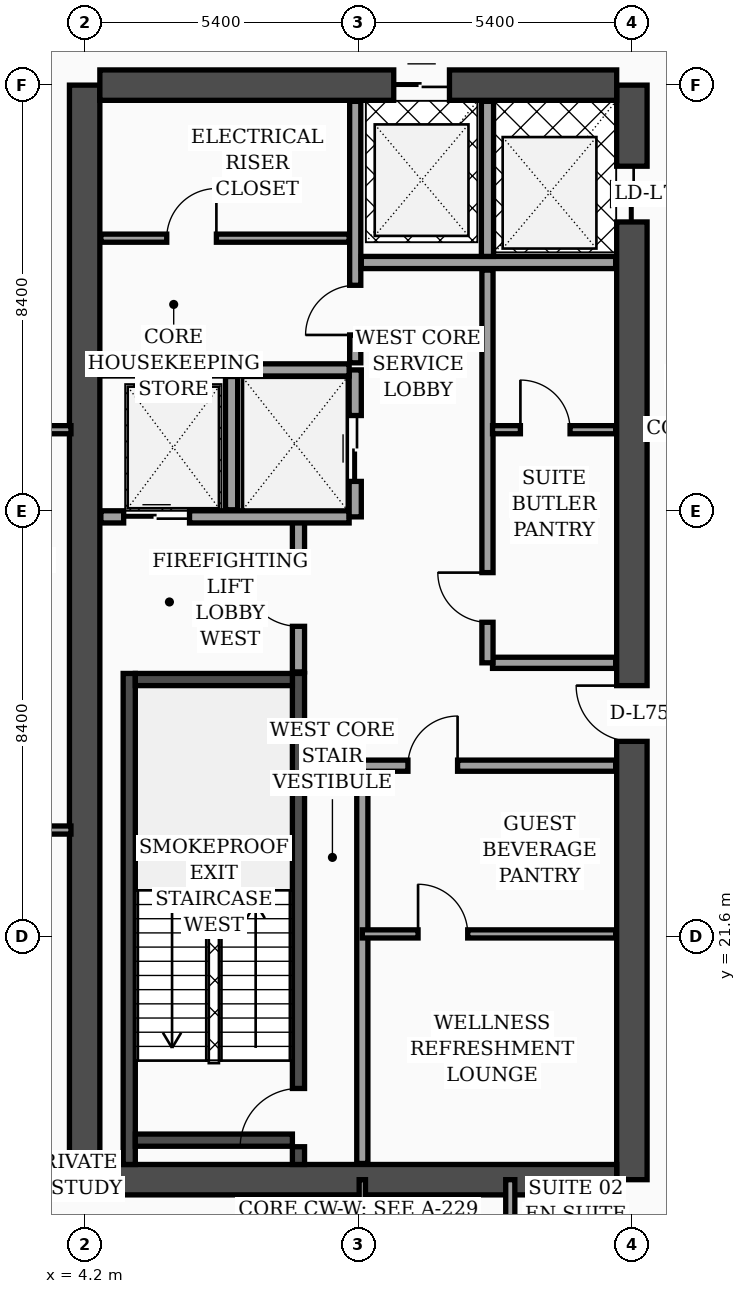
"""IFC4 building model, lengths in metres.
Left out: names, types, materials, properties, quantities, classifications, styles, units other than length and angle.
Written with IfcOpenShell. Run it as: python <this file> out.ifc"""

import sys

from ifc_helpers import new_model, si_unit, direction, frame, frame_2d, origin, place, context, subcontext, project, spatial, rectangle, extrude, element, fill, save


model = new_model("IFC4")
c1 = context("Model", 3, precision=1e-05, world=origin(), true_north=direction((0.0, 1.0)))
c2 = subcontext(c1, "Body", "Model", "MODEL_VIEW")
j1 = project(units=[si_unit("LENGTHUNIT", "METRE"), si_unit("PLANEANGLEUNIT", "RADIAN")], contexts=[c1])
p1 = place(None, origin())
s1 = spatial("IfcSite", under=j1, at=p1, CompositionType="ELEMENT")
p2 = place(p1, origin())
s2 = spatial("IfcBuilding", under=s1, at=p2, CompositionType="ELEMENT")
p3 = place(p2, frame((0.0, 0.0, 302.5)))
s3 = spatial("IfcBuildingStorey", under=s2, at=p3, CompositionType="ELEMENT", Elevation=302.5)
p4 = place(p3, frame((4.2, 16.8, 0.0), z_axis=(0.0, 0.0, 1.0), x_axis=(0.0, 1.0, 0.0)))
e1 = element("IfcWall", 1, at=p4, inside=s3, PredefinedType="SHEAR", context=c2, shape_type="SweptSolid", body=[
    extrude(rectangle(XDim=21.6, YDim=0.6, at=frame_2d((10.8, 0.0))), origin(), (0.0, 0.0, 1.0), 4.05),
])
p5 = place(p3, frame((15.0, 16.8, 0.0), z_axis=(0.0, 0.0, 1.0), x_axis=(0.0, 1.0, 0.0)))
e2 = element("IfcWall", 2, at=p5, inside=s3, PredefinedType="SHEAR", context=c2, shape_type="SweptSolid", body=[
    extrude(rectangle(XDim=21.6, YDim=0.6, at=frame_2d((10.8, 0.0))), origin(), (0.0, 0.0, 1.0), 4.05),
])
p6 = place(p5, frame((8.65, 0.0, 0.0)))
e3 = element("IfcOpeningElement", 3, at=p6, cuts=e2, PredefinedType="OPENING", context=c2, shape_type="SweptSolid", body=[
    extrude(rectangle(XDim=1.1, YDim=2.2, at=frame_2d((0.55, 1.1))), frame((0.0, 0.31, 0.0), z_axis=(0.0, -1.0, 0.0), x_axis=(1.0, 0.0, 0.0)), (0.0, 0.0, 1.0), 0.62),
])
p7 = place(p5, frame((18.9, 0.0, 0.0)))
e4 = element("IfcOpeningElement", 4, at=p7, cuts=e2, PredefinedType="OPENING", context=c2, shape_type="SweptSolid", body=[
    extrude(rectangle(XDim=1.1, YDim=2.2, at=frame_2d((0.55, 1.1))), frame((0.0, 0.31, 0.0), z_axis=(0.0, -1.0, 0.0), x_axis=(1.0, 0.0, 0.0)), (0.0, 0.0, 1.0), 0.62),
])
p8 = place(p3, frame((4.5, 38.4, 0.0), z_axis=(0.0, 0.0, 1.0), x_axis=(1.0, 0.0, 0.0)))
e5 = element("IfcWall", 5, at=p8, inside=s3, PredefinedType="SHEAR", context=c2, shape_type="SweptSolid", body=[
    extrude(rectangle(XDim=10.2, YDim=0.6, at=frame_2d((5.1, 0.0))), origin(), (0.0, 0.0, 1.0), 4.05),
])
p9 = place(p8, frame((5.8, 0.0, 0.0)))
e6 = element("IfcOpeningElement", 6, at=p9, cuts=e5, PredefinedType="OPENING", context=c2, shape_type="SweptSolid", body=[
    extrude(rectangle(XDim=1.1, YDim=2.2, at=frame_2d((0.55, 1.1))), frame((0.0, 0.31, 0.0), z_axis=(0.0, -1.0, 0.0), x_axis=(1.0, 0.0, 0.0)), (0.0, 0.0, 1.0), 0.62),
])
p10 = place(p3, frame((4.5, 16.8, 0.0), z_axis=(0.0, 0.0, 1.0), x_axis=(1.0, 0.0, 0.0)))
e7 = element("IfcWall", 7, at=p10, inside=s3, PredefinedType="SHEAR", context=c2, shape_type="SweptSolid", body=[
    extrude(rectangle(XDim=10.2, YDim=0.6, at=frame_2d((5.1, 0.0))), origin(), (0.0, 0.0, 1.0), 4.05),
])
p11 = place(p3, frame((5.08, 17.1, 0.0), z_axis=(0.0, 0.0, 1.0), x_axis=(0.0, 1.0, 0.0)))
e8 = element("IfcWall", 8, at=p11, inside=s3, PredefinedType="SOLIDWALL", context=c2, shape_type="SweptSolid", body=[
    extrude(rectangle(XDim=9.69, YDim=0.24, at=frame_2d((4.845, 0.0))), origin(), (0.0, 0.0, 1.0), 4.05),
])
p12 = place(p3, frame((8.42, 17.1, 0.0), z_axis=(0.0, 0.0, 1.0), x_axis=(0.0, 1.0, 0.0)))
e9 = element("IfcWall", 9, at=p12, inside=s3, PredefinedType="SOLIDWALL", context=c2, shape_type="SweptSolid", body=[
    extrude(rectangle(XDim=9.69, YDim=0.24, at=frame_2d((4.845, 0.0))), origin(), (0.0, 0.0, 1.0), 4.05),
])
p13 = place(p12, frame((0.35, 0.0, 0.0)))
e10 = element("IfcOpeningElement", 10, at=p13, cuts=e9, PredefinedType="OPENING", context=c2, shape_type="SweptSolid", body=[
    extrude(rectangle(XDim=1.15, YDim=2.2, at=frame_2d((0.575, 1.1))), frame((0.0, 0.13, 0.0), z_axis=(0.0, -1.0, 0.0), x_axis=(1.0, 0.0, 0.0)), (0.0, 0.0, 1.0), 0.26),
])
for number, where, z_axis, x_axis in (
    (11, (5.2, 17.58, 0.0), (0.0, 0.0, 1.0), (1.0, 0.0, 0.0)),
    (12, (5.2, 26.67, 0.0), (0.0, 0.0, 1.0), (1.0, 0.0, 0.0)),
):
    element("IfcWall", number, at=place(p3, frame(where, z_axis=z_axis, x_axis=x_axis)), inside=s3, PredefinedType="SOLIDWALL", context=c2, shape_type="SweptSolid", body=[
        extrude(rectangle(XDim=3.1, YDim=0.24, at=frame_2d((1.55, 0.0))), origin(), (0.0, 0.0, 1.0), 4.05),
    ])
p14 = place(p3, frame((8.42, 26.82, 0.0), z_axis=(0.0, 0.0, 1.0), x_axis=(0.0, 1.0, 0.0)))
e13 = element("IfcWall", 13, at=p14, inside=s3, PredefinedType="SOLIDWALL", context=c2, shape_type="SweptSolid", body=[
    extrude(rectangle(XDim=3.0, YDim=0.24, at=frame_2d((1.5, 0.0))), origin(), (0.0, 0.0, 1.0), 4.05),
])
p15 = place(p14, frame((0.9, 0.0, 0.0)))
e14 = element("IfcOpeningElement", 14, at=p15, cuts=e13, PredefinedType="OPENING", context=c2, shape_type="SweptSolid", body=[
    extrude(rectangle(XDim=1.1, YDim=2.2, at=frame_2d((0.55, 1.1))), frame((0.0, 0.13, 0.0), z_axis=(0.0, -1.0, 0.0), x_axis=(1.0, 0.0, 0.0)), (0.0, 0.0, 1.0), 0.26),
])
p16 = place(p3, frame((4.52, 29.88, 0.0), z_axis=(0.0, 0.0, 1.0), x_axis=(1.0, 0.0, 0.0)))
e15 = element("IfcWall", 15, at=p16, inside=s3, PredefinedType="SOLIDWALL", context=c2, shape_type="SweptSolid", body=[
    extrude(rectangle(XDim=4.9, YDim=0.24, at=frame_2d((2.45, 0.0))), origin(), (0.0, 0.0, 1.0), 4.05),
])
p17 = place(p16, frame((0.45, 0.0, 0.0)))
e16 = element("IfcOpeningElement", 16, at=p17, cuts=e15, PredefinedType="OPENING", context=c2, shape_type="SweptSolid", body=[
    extrude(rectangle(XDim=1.3, YDim=2.35, at=frame_2d((0.65, 1.175))), frame((0.0, 0.13, 0.0), z_axis=(0.0, -1.0, 0.0), x_axis=(1.0, 0.0, 0.0)), (0.0, 0.0, 1.0), 0.26),
])
p18 = place(p3, frame((7.1, 30.02, 0.0), z_axis=(0.0, 0.0, 1.0), x_axis=(0.0, 1.0, 0.0)))
e17 = element("IfcWall", 17, at=p18, inside=s3, PredefinedType="SOLIDWALL", context=c2, shape_type="SweptSolid", body=[
    extrude(rectangle(XDim=2.63, YDim=0.24, at=frame_2d((1.315, 0.0))), origin(), (0.0, 0.0, 1.0), 4.05),
])
p19 = place(p3, frame((9.54, 29.88, 0.0), z_axis=(0.0, 0.0, 1.0), x_axis=(0.0, 1.0, 0.0)))
e18 = element("IfcWall", 18, at=p19, inside=s3, PredefinedType="SOLIDWALL", context=c2, shape_type="SweptSolid", body=[
    extrude(rectangle(XDim=2.9, YDim=0.24, at=frame_2d((1.45, 0.0))), origin(), (0.0, 0.0, 1.0), 4.05),
])
p20 = place(p19, frame((0.7, 0.0, 0.0)))
e19 = element("IfcOpeningElement", 19, at=p20, cuts=e18, PredefinedType="OPENING", context=c2, shape_type="SweptSolid", body=[
    extrude(rectangle(XDim=1.3, YDim=2.35, at=frame_2d((0.65, 1.175))), frame((0.0, 0.13, 0.0), z_axis=(0.0, -1.0, 0.0), x_axis=(1.0, 0.0, 0.0)), (0.0, 0.0, 1.0), 0.26),
])
p21 = place(p3, frame((4.52, 32.78, 0.0), z_axis=(0.0, 0.0, 1.0), x_axis=(1.0, 0.0, 0.0)))
e20 = element("IfcWall", 20, at=p21, inside=s3, PredefinedType="SOLIDWALL", context=c2, shape_type="SweptSolid", body=[
    extrude(rectangle(XDim=4.9, YDim=0.24, at=frame_2d((2.45, 0.0))), origin(), (0.0, 0.0, 1.0), 3.7),
])
p22 = place(p3, frame((9.68, 17.12, 0.0), z_axis=(0.0, 0.0, 1.0), x_axis=(0.0, 1.0, 0.0)))
e21 = element("IfcWall", 21, at=p22, inside=s3, PredefinedType="SOLIDWALL", context=c2, shape_type="SweptSolid", body=[
    extrude(rectangle(XDim=7.88, YDim=0.22, at=frame_2d((3.94, 0.0))), origin(), (0.0, 0.0, 1.0), 4.05),
])
p23 = place(p3, frame((4.52, 35.38, 0.0), z_axis=(0.0, 0.0, 1.0), x_axis=(1.0, 0.0, 0.0)))
e22 = element("IfcWall", 22, at=p23, inside=s3, PredefinedType="PARTITIONING", context=c2, shape_type="SweptSolid", body=[
    extrude(rectangle(XDim=4.9, YDim=0.16, at=frame_2d((2.45, 0.0))), origin(), (0.0, 0.0, 1.0), 4.05),
])
p24 = place(p23, frame((1.3, 0.0, 0.0)))
e23 = element("IfcOpeningElement", 23, at=p24, cuts=e22, PredefinedType="OPENING", context=c2, shape_type="SweptSolid", body=[
    extrude(rectangle(XDim=0.98, YDim=2.15, at=frame_2d((0.49, 1.075))), frame((0.0, 0.09, 0.0), z_axis=(0.0, -1.0, 0.0), x_axis=(1.0, 0.0, 0.0)), (0.0, 0.0, 1.0), 0.18),
])
p25 = place(p3, frame((9.54, 32.92, 0.0), z_axis=(0.0, 0.0, 1.0), x_axis=(0.0, 1.0, 0.0)))
e24 = element("IfcWall", 24, at=p25, inside=s3, PredefinedType="SOLIDWALL", context=c2, shape_type="SweptSolid", body=[
    extrude(rectangle(XDim=5.16, YDim=0.22, at=frame_2d((2.58, 0.0))), origin(), (0.0, 0.0, 1.0), 4.05),
])
p26 = place(p25, frame((0.55, 0.0, 0.0)))
e25 = element("IfcOpeningElement", 25, at=p26, cuts=e24, PredefinedType="OPENING", context=c2, shape_type="SweptSolid", body=[
    extrude(rectangle(XDim=0.98, YDim=2.15, at=frame_2d((0.49, 1.075))), frame((0.0, 0.12, 0.0), z_axis=(0.0, -1.0, 0.0), x_axis=(1.0, 0.0, 0.0)), (0.0, 0.0, 1.0), 0.24),
])
p27 = place(p3, frame((9.68, 21.65, 0.0), z_axis=(0.0, 0.0, 1.0), x_axis=(1.0, 0.0, 0.0)))
e26 = element("IfcWall", 26, at=p27, inside=s3, PredefinedType="PARTITIONING", context=c2, shape_type="SweptSolid", body=[
    extrude(rectangle(XDim=5.0, YDim=0.16, at=frame_2d((2.5, 0.0))), origin(), (0.0, 0.0, 1.0), 4.05),
])
p28 = place(p27, frame((1.1, 0.0, 0.0)))
e27 = element("IfcOpeningElement", 27, at=p28, cuts=e26, PredefinedType="OPENING", context=c2, shape_type="SweptSolid", body=[
    extrude(rectangle(XDim=0.98, YDim=2.15, at=frame_2d((0.49, 1.075))), frame((0.0, 0.09, 0.0), z_axis=(0.0, -1.0, 0.0), x_axis=(1.0, 0.0, 0.0)), (0.0, 0.0, 1.0), 0.18),
])
p29 = place(p3, frame((9.68, 24.97, 0.0), z_axis=(0.0, 0.0, 1.0), x_axis=(1.0, 0.0, 0.0)))
e28 = element("IfcWall", 28, at=p29, inside=s3, PredefinedType="SOLIDWALL", context=c2, shape_type="SweptSolid", body=[
    extrude(rectangle(XDim=5.0, YDim=0.22, at=frame_2d((2.5, 0.0))), origin(), (0.0, 0.0, 1.0), 3.5),
])
p30 = place(p29, frame((0.9, 0.0, 0.0)))
e29 = element("IfcOpeningElement", 29, at=p30, cuts=e28, PredefinedType="OPENING", context=c2, shape_type="SweptSolid", body=[
    extrude(rectangle(XDim=0.98, YDim=2.15, at=frame_2d((0.49, 1.075))), frame((0.0, 0.12, 0.0), z_axis=(0.0, -1.0, 0.0), x_axis=(1.0, 0.0, 0.0)), (0.0, 0.0, 1.0), 0.24),
])
p31 = place(p3, frame((12.25, 27.0, 0.0), z_axis=(0.0, 0.0, 1.0), x_axis=(1.0, 0.0, 0.0)))
e30 = element("IfcWall", 30, at=p31, inside=s3, PredefinedType="SOLIDWALL", context=c2, shape_type="SweptSolid", body=[
    extrude(rectangle(XDim=2.43, YDim=0.22, at=frame_2d((1.215, 0.0))), origin(), (0.0, 0.0, 1.0), 4.05),
])
p32 = place(p3, frame((12.15, 27.0, 0.0), z_axis=(0.0, 0.0, 1.0), x_axis=(0.0, 1.0, 0.0)))
e31 = element("IfcWall", 31, at=p32, inside=s3, PredefinedType="SOLIDWALL", context=c2, shape_type="SweptSolid", body=[
    extrude(rectangle(XDim=7.75, YDim=0.22, at=frame_2d((3.875, 0.0))), origin(), (0.0, 0.0, 1.0), 4.05),
])
p33 = place(p32, frame((0.8, 0.0, 0.0)))
e32 = element("IfcOpeningElement", 32, at=p33, cuts=e31, PredefinedType="OPENING", context=c2, shape_type="SweptSolid", body=[
    extrude(rectangle(XDim=0.98, YDim=2.15, at=frame_2d((0.49, 1.075))), frame((0.0, 0.12, 0.0), z_axis=(0.0, -1.0, 0.0), x_axis=(1.0, 0.0, 0.0)), (0.0, 0.0, 1.0), 0.24),
])
p34 = place(p3, frame((12.25, 31.6, 0.0), z_axis=(0.0, 0.0, 1.0), x_axis=(1.0, 0.0, 0.0)))
e33 = element("IfcWall", 33, at=p34, inside=s3, PredefinedType="PARTITIONING", context=c2, shape_type="SweptSolid", body=[
    extrude(rectangle(XDim=2.43, YDim=0.16, at=frame_2d((1.215, 0.0))), origin(), (0.0, 0.0, 1.0), 3.65),
])
p35 = place(p34, frame((0.55, 0.0, 0.0)))
e34 = element("IfcOpeningElement", 34, at=p35, cuts=e33, PredefinedType="OPENING", context=c2, shape_type="SweptSolid", body=[
    extrude(rectangle(XDim=0.98, YDim=2.15, at=frame_2d((0.49, 1.075))), frame((0.0, 0.09, 0.0), z_axis=(0.0, -1.0, 0.0), x_axis=(1.0, 0.0, 0.0)), (0.0, 0.0, 1.0), 0.18),
])
p36 = place(p3, frame((9.66, 34.9, 0.0), z_axis=(0.0, 0.0, 1.0), x_axis=(1.0, 0.0, 0.0)))
e35 = element("IfcWall", 35, at=p36, inside=s3, PredefinedType="SOLIDWALL", context=c2, shape_type="SweptSolid", body=[
    extrude(rectangle(XDim=5.02, YDim=0.24, at=frame_2d((2.51, 0.0))), origin(), (0.0, 0.0, 1.0), 4.05),
])
p37 = place(p3, frame((12.15, 35.02, 0.0), z_axis=(0.0, 0.0, 1.0), x_axis=(0.0, 1.0, 0.0)))
e36 = element("IfcWall", 36, at=p37, inside=s3, PredefinedType="SOLIDWALL", context=c2, shape_type="SweptSolid", body=[
    extrude(rectangle(XDim=3.06, YDim=0.24, at=frame_2d((1.53, 0.0))), origin(), (0.0, 0.0, 1.0), 4.05),
])
p38 = place(p3, frame((0.08, 23.7, 0.0), z_axis=(0.0, 0.0, 1.0), x_axis=(1.0, 0.0, 0.0)))
e37 = element("IfcWall", 37, at=p38, inside=s3, PredefinedType="PARTITIONING", context=c2, shape_type="SweptSolid", body=[
    extrude(rectangle(XDim=3.85, YDim=0.16, at=frame_2d((1.925, 0.0))), origin(), (0.0, 0.0, 1.0), 3.6),
])
p39 = place(p38, frame((1.35, 0.0, 0.0)))
e38 = element("IfcOpeningElement", 38, at=p39, cuts=e37, PredefinedType="OPENING", context=c2, shape_type="SweptSolid", body=[
    extrude(rectangle(XDim=0.96, YDim=2.2, at=frame_2d((0.48, 1.1))), frame((0.0, 0.09, 0.0), z_axis=(0.0, -1.0, 0.0), x_axis=(1.0, 0.0, 0.0)), (0.0, 0.0, 1.0), 0.18),
])
p40 = place(p3, frame((0.08, 31.6, 0.0), z_axis=(0.0, 0.0, 1.0), x_axis=(1.0, 0.0, 0.0)))
e39 = element("IfcWall", 39, at=p40, inside=s3, PredefinedType="PARTITIONING", context=c2, shape_type="SweptSolid", body=[
    extrude(rectangle(XDim=3.85, YDim=0.16, at=frame_2d((1.925, 0.0))), origin(), (0.0, 0.0, 1.0), 3.6),
])
p41 = place(p40, frame((1.35, 0.0, 0.0)))
e40 = element("IfcOpeningElement", 40, at=p41, cuts=e39, PredefinedType="OPENING", context=c2, shape_type="SweptSolid", body=[
    extrude(rectangle(XDim=0.96, YDim=2.2, at=frame_2d((0.48, 1.1))), frame((0.0, 0.09, 0.0), z_axis=(0.0, -1.0, 0.0), x_axis=(1.0, 0.0, 0.0)), (0.0, 0.0, 1.0), 0.18),
])
p42 = place(p3, frame((0.08, 16.8, 0.0), z_axis=(0.0, 0.0, 1.0), x_axis=(1.0, 0.0, 0.0)))
e41 = element("IfcWall", 41, at=p42, inside=s3, PredefinedType="PARTITIONING", context=c2, shape_type="SweptSolid", body=[
    extrude(rectangle(XDim=3.85, YDim=0.18, at=frame_2d((1.925, 0.0))), origin(), (0.0, 0.0, 1.0), 3.5),
])
p43 = place(p3, frame((9.68, 14.71, 0.0), z_axis=(0.0, 0.0, 1.0), x_axis=(0.0, 1.0, 0.0)))
e42 = element("IfcWall", 42, at=p43, inside=s3, PredefinedType="PARTITIONING", context=c2, shape_type="SweptSolid", body=[
    extrude(rectangle(XDim=2.09, YDim=0.125, at=frame_2d((1.045, 0.0))), origin(), (0.0, 0.0, 1.0), 4.05),
])
p44 = place(p3, frame((12.6, 2.44, 0.0), z_axis=(0.0, 0.0, 1.0), x_axis=(0.0, 1.0, 0.0)))
e43 = element("IfcWall", 43, at=p44, inside=s3, PredefinedType="PARTITIONING", context=c2, shape_type="SweptSolid", body=[
    extrude(rectangle(XDim=14.36, YDim=0.18, at=frame_2d((7.18, 0.0))), origin(), (0.0, 0.0, 1.0), 2.35),
])
p45 = place(p44, frame((3.01, 0.0, 0.0)))
e44 = element("IfcOpeningElement", 44, at=p45, cuts=e43, PredefinedType="OPENING", context=c2, shape_type="SweptSolid", body=[
    extrude(rectangle(XDim=1.02, YDim=2.2, at=frame_2d((0.51, 1.1))), frame((0.0, 0.1, 0.0), z_axis=(0.0, -1.0, 0.0), x_axis=(1.0, 0.0, 0.0)), (0.0, 0.0, 1.0), 0.2),
])
p46 = place(p44, frame((9.03, 0.0, 0.0)))
e45 = element("IfcOpeningElement", 45, at=p46, cuts=e43, PredefinedType="OPENING", context=c2, shape_type="SweptSolid", body=[
    extrude(rectangle(XDim=1.02, YDim=2.2, at=frame_2d((0.51, 1.1))), frame((0.0, 0.1, 0.0), z_axis=(0.0, -1.0, 0.0), x_axis=(1.0, 0.0, 0.0)), (0.0, 0.0, 1.0), 0.2),
])
p47 = place(p15, origin())
e46 = element("IfcDoor", 46, at=p47, inside=s3, OperationType="SINGLE_SWING_RIGHT", PredefinedType="DOOR", context=c2, shape_type="SweptSolid", body=[
    extrude(rectangle(XDim=1.1, YDim=2.2, at=frame_2d((0.55, 1.1))), frame((0.0, 0.025, 0.0), z_axis=(0.0, -1.0, 0.0), x_axis=(1.0, 0.0, 0.0)), (0.0, 0.0, 1.0), 0.05),
])
fill(e14, e46)
p48 = place(p17, origin())
e47 = element("IfcDoor", 47, at=p48, inside=s3, OperationType="DOUBLE_DOOR_SLIDING", PredefinedType="DOOR", context=c2, shape_type="SweptSolid", body=[
    extrude(rectangle(XDim=1.3, YDim=2.35, at=frame_2d((0.65, 1.175))), frame((0.0, 0.025, 0.0), z_axis=(0.0, -1.0, 0.0), x_axis=(1.0, 0.0, 0.0)), (0.0, 0.0, 1.0), 0.05),
])
fill(e16, e47)
p49 = place(p20, origin())
e48 = element("IfcDoor", 48, at=p49, inside=s3, OperationType="DOUBLE_DOOR_SLIDING", PredefinedType="DOOR", context=c2, shape_type="SweptSolid", body=[
    extrude(rectangle(XDim=1.3, YDim=2.35, at=frame_2d((0.65, 1.175))), frame((0.0, 0.025, 0.0), z_axis=(0.0, -1.0, 0.0), x_axis=(1.0, 0.0, 0.0)), (0.0, 0.0, 1.0), 0.05),
])
fill(e19, e48)
p50 = place(p24, origin())
e49 = element("IfcDoor", 49, at=p50, inside=s3, OperationType="SINGLE_SWING_RIGHT", PredefinedType="DOOR", context=c2, shape_type="SweptSolid", body=[
    extrude(rectangle(XDim=0.98, YDim=2.15, at=frame_2d((0.49, 1.075))), frame((0.0, 0.025, 0.0), z_axis=(0.0, -1.0, 0.0), x_axis=(1.0, 0.0, 0.0)), (0.0, 0.0, 1.0), 0.05),
])
fill(e23, e49)
p51 = place(p26, origin())
e50 = element("IfcDoor", 50, at=p51, inside=s3, OperationType="SINGLE_SWING_LEFT", PredefinedType="DOOR", context=c2, shape_type="SweptSolid", body=[
    extrude(rectangle(XDim=0.98, YDim=2.15, at=frame_2d((0.49, 1.075))), frame((0.0, 0.025, 0.0), z_axis=(0.0, -1.0, 0.0), x_axis=(1.0, 0.0, 0.0)), (0.0, 0.0, 1.0), 0.05),
])
fill(e25, e50)
p52 = place(p28, origin())
e51 = element("IfcDoor", 51, at=p52, inside=s3, OperationType="SINGLE_SWING_LEFT", PredefinedType="DOOR", context=c2, shape_type="SweptSolid", body=[
    extrude(rectangle(XDim=0.98, YDim=2.15, at=frame_2d((0.49, 1.075))), frame((0.0, 0.025, 0.0), z_axis=(0.0, -1.0, 0.0), x_axis=(1.0, 0.0, 0.0)), (0.0, 0.0, 1.0), 0.05),
])
fill(e27, e51)
p53 = place(p30, origin())
e52 = element("IfcDoor", 52, at=p53, inside=s3, OperationType="SINGLE_SWING_RIGHT", PredefinedType="DOOR", context=c2, shape_type="SweptSolid", body=[
    extrude(rectangle(XDim=0.98, YDim=2.15, at=frame_2d((0.49, 1.075))), frame((0.0, 0.025, 0.0), z_axis=(0.0, -1.0, 0.0), x_axis=(1.0, 0.0, 0.0)), (0.0, 0.0, 1.0), 0.05),
])
fill(e29, e52)
p54 = place(p33, origin())
e53 = element("IfcDoor", 53, at=p54, inside=s3, OperationType="SINGLE_SWING_RIGHT", PredefinedType="DOOR", context=c2, shape_type="SweptSolid", body=[
    extrude(rectangle(XDim=0.98, YDim=2.15, at=frame_2d((0.49, 1.075))), frame((0.0, 0.025, 0.0), z_axis=(0.0, -1.0, 0.0), x_axis=(1.0, 0.0, 0.0)), (0.0, 0.0, 1.0), 0.05),
])
fill(e32, e53)
p55 = place(p35, origin())
e54 = element("IfcDoor", 54, at=p55, inside=s3, OperationType="SINGLE_SWING_LEFT", PredefinedType="DOOR", context=c2, shape_type="SweptSolid", body=[
    extrude(rectangle(XDim=0.98, YDim=2.15, at=frame_2d((0.49, 1.075))), frame((0.0, 0.025, 0.0), z_axis=(0.0, -1.0, 0.0), x_axis=(1.0, 0.0, 0.0)), (0.0, 0.0, 1.0), 0.05),
])
fill(e34, e54)
p56 = place(p13, origin())
e55 = element("IfcDoor", 55, at=p56, inside=s3, OperationType="SINGLE_SWING_LEFT", PredefinedType="DOOR", context=c2, shape_type="SweptSolid", body=[
    extrude(rectangle(XDim=1.15, YDim=2.2, at=frame_2d((0.575, 1.1))), frame((0.0, 0.025, 0.0), z_axis=(0.0, -1.0, 0.0), x_axis=(1.0, 0.0, 0.0)), (0.0, 0.0, 1.0), 0.05),
])
fill(e10, e55)
p57 = place(p6, origin())
e56 = element("IfcDoor", 56, at=p57, inside=s3, OperationType="SINGLE_SWING_RIGHT", PredefinedType="DOOR", context=c2, shape_type="SweptSolid", body=[
    extrude(rectangle(XDim=1.1, YDim=2.2, at=frame_2d((0.55, 1.1))), frame((0.0, 0.025, 0.0), z_axis=(0.0, -1.0, 0.0), x_axis=(1.0, 0.0, 0.0)), (0.0, 0.0, 1.0), 0.05),
])
fill(e3, e56)
p58 = place(p7, origin())
e57 = element("IfcDoor", 57, at=p58, inside=s3, OperationType="DOUBLE_DOOR_SLIDING", PredefinedType="DOOR", context=c2, shape_type="SweptSolid", body=[
    extrude(rectangle(XDim=1.1, YDim=2.2, at=frame_2d((0.55, 1.1))), frame((0.0, 0.025, 0.0), z_axis=(0.0, -1.0, 0.0), x_axis=(1.0, 0.0, 0.0)), (0.0, 0.0, 1.0), 0.05),
])
fill(e4, e57)
p59 = place(p9, origin())
e58 = element("IfcDoor", 58, at=p59, inside=s3, OperationType="DOUBLE_DOOR_SLIDING", PredefinedType="DOOR", context=c2, shape_type="SweptSolid", body=[
    extrude(rectangle(XDim=1.1, YDim=2.2, at=frame_2d((0.55, 1.1))), frame((0.0, 0.025, 0.0), z_axis=(0.0, -1.0, 0.0), x_axis=(1.0, 0.0, 0.0)), (0.0, 0.0, 1.0), 0.05),
])
fill(e6, e58)
save(model, sys.argv[1])
